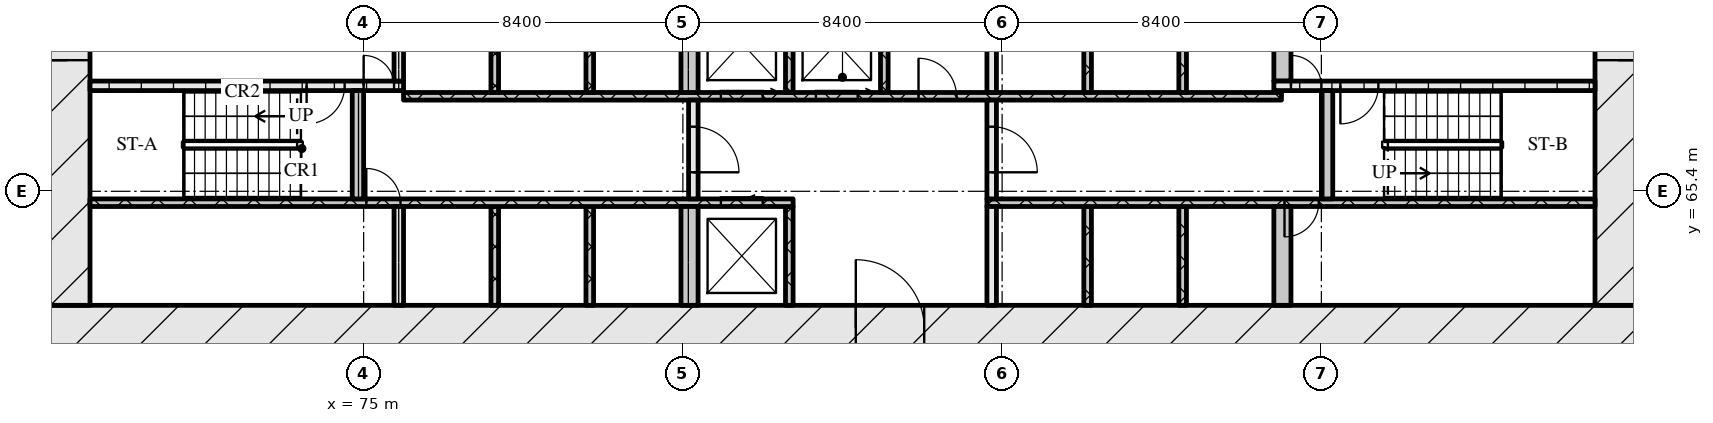
"""IFC4 building model, lengths in metres.
Left out: names, types, materials, properties, quantities, classifications, styles, units other than length and angle.
Written with IfcOpenShell. Run it as: python <this file> out.ifc"""

import sys

from ifc_helpers import new_model, si_unit, direction, frame, frame_2d, origin, place, context, subcontext, project, spatial, rectangle, extrude, element, fill, save


model = new_model("IFC4")
c1 = context("Model", 3, precision=1e-05, world=origin(), true_north=direction((0.0, 1.0)))
c2 = subcontext(c1, "Body", "Model", "MODEL_VIEW")
j1 = project(units=[si_unit("LENGTHUNIT", "METRE"), si_unit("PLANEANGLEUNIT", "RADIAN")], contexts=[c1])
p1 = place(None, origin())
s1 = spatial("IfcSite", under=j1, at=p1, CompositionType="ELEMENT")
p2 = place(p1, origin())
s2 = spatial("IfcBuilding", under=s1, at=p2, CompositionType="ELEMENT")
p3 = place(p2, frame((0.0, 0.0, 19.2)))
s3 = spatial("IfcBuildingStorey", under=s2, at=p3, CompositionType="ELEMENT", Elevation=19.2)
p4 = place(p3, frame((66.6, 61.8, 0.0), z_axis=(0.0, 0.0, 1.0), x_axis=(1.0, 0.0, 0.0)))
e1 = element("IfcWall", 1, at=p4, inside=s3, PredefinedType="SOLIDWALL", context=c2, shape_type="SweptSolid", body=[
    extrude(rectangle(XDim=42.0, YDim=1.2, at=frame_2d((21.0, 0.0))), origin(), (0.0, 0.0, 1.0), 4.2),
])
p5 = place(p4, frame((21.35, 0.0, 0.0)))
e2 = element("IfcOpeningElement", 2, at=p5, cuts=e1, PredefinedType="OPENING", context=c2, shape_type="SweptSolid", body=[
    extrude(rectangle(XDim=1.8, YDim=2.1, at=frame_2d((0.9, 1.05))), frame((0.0, 0.61, 0.0), z_axis=(0.0, -1.0, 0.0), x_axis=(1.0, 0.0, 0.0)), (0.0, 0.0, 1.0), 1.22),
])
p6 = place(p3, frame((67.2, 62.4, 0.0), z_axis=(0.0, 0.0, 1.0), x_axis=(0.0, 1.0, 0.0)))
e3 = element("IfcWall", 3, at=p6, inside=s3, PredefinedType="SOLIDWALL", context=c2, shape_type="SweptSolid", body=[
    extrude(rectangle(XDim=12.0, YDim=1.2, at=frame_2d((6.0, 0.0))), origin(), (0.0, 0.0, 1.0), 4.2),
])
p7 = place(p6, frame((6.45, 0.0, 0.0)))
e4 = element("IfcOpeningElement", 4, at=p7, cuts=e3, PredefinedType="OPENING", context=c2, shape_type="SweptSolid", body=[
    extrude(rectangle(XDim=1.2, YDim=2.1, at=frame_2d((0.6, 1.05))), frame((0.0, 0.61, 0.0), z_axis=(0.0, -1.0, 0.0), x_axis=(1.0, 0.0, 0.0)), (0.0, 0.0, 1.0), 1.22),
])
p8 = place(p3, frame((108.0, 62.4, 0.0), z_axis=(0.0, 0.0, 1.0), x_axis=(0.0, 1.0, 0.0)))
e5 = element("IfcWall", 5, at=p8, inside=s3, PredefinedType="SOLIDWALL", context=c2, shape_type="SweptSolid", body=[
    extrude(rectangle(XDim=12.0, YDim=1.2, at=frame_2d((6.0, 0.0))), origin(), (0.0, 0.0, 1.0), 4.2),
])
p9 = place(p8, frame((6.45, 0.0, 0.0)))
e6 = element("IfcOpeningElement", 6, at=p9, cuts=e5, PredefinedType="OPENING", context=c2, shape_type="SweptSolid", body=[
    extrude(rectangle(XDim=1.2, YDim=2.1, at=frame_2d((0.6, 1.05))), frame((0.0, 0.61, 0.0), z_axis=(0.0, -1.0, 0.0), x_axis=(1.0, 0.0, 0.0)), (0.0, 0.0, 1.0), 1.22),
])
p10 = place(p3, frame((75.925, 62.4, 0.0), z_axis=(0.0, 0.0, 1.0), x_axis=(0.0, 1.0, 0.0)))
e7 = element("IfcWall", 7, at=p10, inside=s3, PredefinedType="SOLIDWALL", context=c2, shape_type="SweptSolid", body=[
    extrude(rectangle(XDim=2.6, YDim=0.25, at=frame_2d((1.3, 0.0))), origin(), (0.0, 0.0, 1.0), 4.2),
])
for number, where, z_axis, x_axis in (
    (8, (78.45, 62.4, 0.0), (0.0, 0.0, 1.0), (0.0, 1.0, 0.0)),
    (9, (80.95, 62.4, 0.0), (0.0, 0.0, 1.0), (0.0, 1.0, 0.0)),
):
    element("IfcWall", number, at=place(p3, frame(where, z_axis=z_axis, x_axis=x_axis)), inside=s3, PredefinedType="SOLIDWALL", context=c2, shape_type="SweptSolid", body=[
        extrude(rectangle(XDim=2.6, YDim=0.2, at=frame_2d((1.3, 0.0))), origin(), (0.0, 0.0, 1.0), 4.2),
    ])
p11 = place(p3, frame((83.575, 62.4, 0.0), z_axis=(0.0, 0.0, 1.0), x_axis=(0.0, 1.0, 0.0)))
e10 = element("IfcWall", 10, at=p11, inside=s3, PredefinedType="SOLIDWALL", context=c2, shape_type="SweptSolid", body=[
    extrude(rectangle(XDim=2.6, YDim=0.45, at=frame_2d((1.3, 0.0))), origin(), (0.0, 0.0, 1.0), 4.2),
])
p12 = place(p3, frame((86.2, 62.4, 0.0), z_axis=(0.0, 0.0, 1.0), x_axis=(0.0, 1.0, 0.0)))
e11 = element("IfcWall", 11, at=p12, inside=s3, PredefinedType="SOLIDWALL", context=c2, shape_type="SweptSolid", body=[
    extrude(rectangle(XDim=2.6, YDim=0.2, at=frame_2d((1.3, 0.0))), origin(), (0.0, 0.0, 1.0), 4.2),
])
p13 = place(p3, frame((91.525, 62.4, 0.0), z_axis=(0.0, 0.0, 1.0), x_axis=(0.0, 1.0, 0.0)))
e12 = element("IfcWall", 12, at=p13, inside=s3, PredefinedType="SOLIDWALL", context=c2, shape_type="SweptSolid", body=[
    extrude(rectangle(XDim=2.6, YDim=0.25, at=frame_2d((1.3, 0.0))), origin(), (0.0, 0.0, 1.0), 4.2),
])
for number, where, z_axis, x_axis in (
    (13, (94.05, 62.4, 0.0), (0.0, 0.0, 1.0), (0.0, 1.0, 0.0)),
    (14, (96.55, 62.4, 0.0), (0.0, 0.0, 1.0), (0.0, 1.0, 0.0)),
):
    element("IfcWall", number, at=place(p3, frame(where, z_axis=z_axis, x_axis=x_axis)), inside=s3, PredefinedType="SOLIDWALL", context=c2, shape_type="SweptSolid", body=[
        extrude(rectangle(XDim=2.6, YDim=0.2, at=frame_2d((1.3, 0.0))), origin(), (0.0, 0.0, 1.0), 4.2),
    ])
p14 = place(p3, frame((99.175, 62.4, 0.0), z_axis=(0.0, 0.0, 1.0), x_axis=(0.0, 1.0, 0.0)))
e15 = element("IfcWall", 15, at=p14, inside=s3, PredefinedType="SOLIDWALL", context=c2, shape_type="SweptSolid", body=[
    extrude(rectangle(XDim=2.6, YDim=0.45, at=frame_2d((1.3, 0.0))), origin(), (0.0, 0.0, 1.0), 4.2),
])
p15 = place(p3, frame((67.8, 65.1, 0.0), z_axis=(0.0, 0.0, 1.0), x_axis=(1.0, 0.0, 0.0)))
e16 = element("IfcWall", 16, at=p15, inside=s3, PredefinedType="SOLIDWALL", context=c2, shape_type="SweptSolid", body=[
    extrude(rectangle(XDim=18.5, YDim=0.2, at=frame_2d((9.25, 0.0))), origin(), (0.0, 0.0, 1.0), 4.2),
])
p16 = place(p15, frame((7.27, 0.0, 0.0)))
e17 = element("IfcOpeningElement", 17, at=p16, cuts=e16, PredefinedType="OPENING", context=c2, shape_type="SweptSolid", body=[
    extrude(rectangle(XDim=0.9, YDim=2.1, at=frame_2d((0.45, 1.05))), frame((0.0, 0.11, 0.0), z_axis=(0.0, -1.0, 0.0), x_axis=(1.0, 0.0, 0.0)), (0.0, 0.0, 1.0), 0.22),
])
p17 = place(p15, frame((16.6, 0.0, 0.0)))
e18 = element("IfcOpeningElement", 18, at=p17, cuts=e16, PredefinedType="OPENING", context=c2, shape_type="SweptSolid", body=[
    extrude(rectangle(XDim=1.1, YDim=2.1, at=frame_2d((0.55, 1.05))), frame((0.0, 0.11, 0.0), z_axis=(0.0, -1.0, 0.0), x_axis=(1.0, 0.0, 0.0)), (0.0, 0.0, 1.0), 0.22),
])
p18 = place(p3, frame((91.4, 65.1, 0.0), z_axis=(0.0, 0.0, 1.0), x_axis=(1.0, 0.0, 0.0)))
e19 = element("IfcWall", 19, at=p18, inside=s3, PredefinedType="SOLIDWALL", context=c2, shape_type="SweptSolid", body=[
    extrude(rectangle(XDim=16.0, YDim=0.2, at=frame_2d((8.0, 0.0))), origin(), (0.0, 0.0, 1.0), 4.2),
])
p19 = place(p18, frame((7.83, 0.0, 0.0)))
e20 = element("IfcOpeningElement", 20, at=p19, cuts=e19, PredefinedType="OPENING", context=c2, shape_type="SweptSolid", body=[
    extrude(rectangle(XDim=0.9, YDim=2.1, at=frame_2d((0.45, 1.05))), frame((0.0, 0.11, 0.0), z_axis=(0.0, -1.0, 0.0), x_axis=(1.0, 0.0, 0.0)), (0.0, 0.0, 1.0), 0.22),
])
p20 = place(p3, frame((74.85, 65.2, 0.0), z_axis=(0.0, 0.0, 1.0), x_axis=(0.0, 1.0, 0.0)))
e21 = element("IfcWall", 21, at=p20, inside=s3, PredefinedType="SOLIDWALL", context=c2, shape_type="SweptSolid", body=[
    extrude(rectangle(XDim=2.85, YDim=0.3, at=frame_2d((1.425, 0.0))), origin(), (0.0, 0.0, 1.0), 4.2),
])
p21 = place(p3, frame((83.675, 65.2, 0.0), z_axis=(0.0, 0.0, 1.0), x_axis=(0.0, 1.0, 0.0)))
e22 = element("IfcWall", 22, at=p21, inside=s3, PredefinedType="SOLIDWALL", context=c2, shape_type="SweptSolid", body=[
    extrude(rectangle(XDim=2.6, YDim=0.25, at=frame_2d((1.3, 0.0))), origin(), (0.0, 0.0, 1.0), 4.2),
])
p22 = place(p21, frame((0.7, 0.0, 0.0)))
e23 = element("IfcOpeningElement", 23, at=p22, cuts=e22, PredefinedType="OPENING", context=c2, shape_type="SweptSolid", body=[
    extrude(rectangle(XDim=1.2, YDim=2.1, at=frame_2d((0.6, 1.05))), frame((0.0, 0.135, 0.0), z_axis=(0.0, -1.0, 0.0), x_axis=(1.0, 0.0, 0.0)), (0.0, 0.0, 1.0), 0.27),
])
p23 = place(p3, frame((91.525, 65.2, 0.0), z_axis=(0.0, 0.0, 1.0), x_axis=(0.0, 1.0, 0.0)))
e24 = element("IfcWall", 24, at=p23, inside=s3, PredefinedType="SOLIDWALL", context=c2, shape_type="SweptSolid", body=[
    extrude(rectangle(XDim=2.6, YDim=0.25, at=frame_2d((1.3, 0.0))), origin(), (0.0, 0.0, 1.0), 4.2),
])
p24 = place(p23, frame((0.7, 0.0, 0.0)))
e25 = element("IfcOpeningElement", 25, at=p24, cuts=e24, PredefinedType="OPENING", context=c2, shape_type="SweptSolid", body=[
    extrude(rectangle(XDim=1.2, YDim=2.1, at=frame_2d((0.6, 1.05))), frame((0.0, 0.135, 0.0), z_axis=(0.0, -1.0, 0.0), x_axis=(1.0, 0.0, 0.0)), (0.0, 0.0, 1.0), 0.27),
])
p25 = place(p3, frame((100.35, 65.2, 0.0), z_axis=(0.0, 0.0, 1.0), x_axis=(0.0, 1.0, 0.0)))
e26 = element("IfcWall", 26, at=p25, inside=s3, PredefinedType="SOLIDWALL", context=c2, shape_type="SweptSolid", body=[
    extrude(rectangle(XDim=2.85, YDim=0.3, at=frame_2d((1.425, 0.0))), origin(), (0.0, 0.0, 1.0), 4.2),
])
p26 = place(p3, frame((76.05, 67.9, 0.0), z_axis=(0.0, 0.0, 1.0), x_axis=(1.0, 0.0, 0.0)))
e27 = element("IfcWall", 27, at=p26, inside=s3, PredefinedType="SOLIDWALL", context=c2, shape_type="SweptSolid", body=[
    extrude(rectangle(XDim=23.1, YDim=0.2, at=frame_2d((11.55, 0.0))), origin(), (0.0, 0.0, 1.0), 4.2),
])
p27 = place(p26, frame((8.35, 0.0, 0.0)))
e28 = element("IfcOpeningElement", 28, at=p27, cuts=e27, PredefinedType="OPENING", context=c2, shape_type="SweptSolid", body=[
    extrude(rectangle(XDim=1.1, YDim=2.1, at=frame_2d((0.55, 1.05))), frame((0.0, 0.11, 0.0), z_axis=(0.0, -1.0, 0.0), x_axis=(1.0, 0.0, 0.0)), (0.0, 0.0, 1.0), 0.22),
])
p28 = place(p26, frame((10.85, 0.0, 0.0)))
e29 = element("IfcOpeningElement", 29, at=p28, cuts=e27, PredefinedType="OPENING", context=c2, shape_type="SweptSolid", body=[
    extrude(rectangle(XDim=1.1, YDim=2.1, at=frame_2d((0.55, 1.05))), frame((0.0, 0.11, 0.0), z_axis=(0.0, -1.0, 0.0), x_axis=(1.0, 0.0, 0.0)), (0.0, 0.0, 1.0), 0.22),
])
p29 = place(p26, frame((13.55, 0.0, 0.0)))
e30 = element("IfcOpeningElement", 30, at=p29, cuts=e27, PredefinedType="OPENING", context=c2, shape_type="SweptSolid", body=[
    extrude(rectangle(XDim=1.0, YDim=2.1, at=frame_2d((0.5, 1.05))), frame((0.0, 0.11, 0.0), z_axis=(0.0, -1.0, 0.0), x_axis=(1.0, 0.0, 0.0)), (0.0, 0.0, 1.0), 0.22),
])
for number, where, z_axis, x_axis in (
    (31, (78.45, 68.0, 0.0), (0.0, 0.0, 1.0), (0.0, 1.0, 0.0)),
    (32, (80.95, 68.0, 0.0), (0.0, 0.0, 1.0), (0.0, 1.0, 0.0)),
):
    element("IfcWall", number, at=place(p3, frame(where, z_axis=z_axis, x_axis=x_axis)), inside=s3, PredefinedType="SOLIDWALL", context=c2, shape_type="SweptSolid", body=[
        extrude(rectangle(XDim=2.6, YDim=0.2, at=frame_2d((1.3, 0.0))), origin(), (0.0, 0.0, 1.0), 4.2),
    ])
p30 = place(p3, frame((83.575, 68.0, 0.0), z_axis=(0.0, 0.0, 1.0), x_axis=(0.0, 1.0, 0.0)))
e33 = element("IfcWall", 33, at=p30, inside=s3, PredefinedType="SOLIDWALL", context=c2, shape_type="SweptSolid", body=[
    extrude(rectangle(XDim=2.6, YDim=0.45, at=frame_2d((1.3, 0.0))), origin(), (0.0, 0.0, 1.0), 4.2),
])
for number, where, z_axis, x_axis in (
    (34, (86.2, 68.0, 0.0), (0.0, 0.0, 1.0), (0.0, 1.0, 0.0)),
    (35, (88.7, 68.0, 0.0), (0.0, 0.0, 1.0), (0.0, 1.0, 0.0)),
):
    element("IfcWall", number, at=place(p3, frame(where, z_axis=z_axis, x_axis=x_axis)), inside=s3, PredefinedType="SOLIDWALL", context=c2, shape_type="SweptSolid", body=[
        extrude(rectangle(XDim=2.6, YDim=0.2, at=frame_2d((1.3, 0.0))), origin(), (0.0, 0.0, 1.0), 4.2),
    ])
p31 = place(p3, frame((91.525, 68.0, 0.0), z_axis=(0.0, 0.0, 1.0), x_axis=(0.0, 1.0, 0.0)))
e36 = element("IfcWall", 36, at=p31, inside=s3, PredefinedType="SOLIDWALL", context=c2, shape_type="SweptSolid", body=[
    extrude(rectangle(XDim=2.6, YDim=0.25, at=frame_2d((1.3, 0.0))), origin(), (0.0, 0.0, 1.0), 4.2),
])
for number, where, z_axis, x_axis in (
    (37, (94.05, 68.0, 0.0), (0.0, 0.0, 1.0), (0.0, 1.0, 0.0)),
    (38, (96.55, 68.0, 0.0), (0.0, 0.0, 1.0), (0.0, 1.0, 0.0)),
):
    element("IfcWall", number, at=place(p3, frame(where, z_axis=z_axis, x_axis=x_axis)), inside=s3, PredefinedType="SOLIDWALL", context=c2, shape_type="SweptSolid", body=[
        extrude(rectangle(XDim=2.6, YDim=0.2, at=frame_2d((1.3, 0.0))), origin(), (0.0, 0.0, 1.0), 4.2),
    ])
p32 = place(p3, frame((98.95, 68.025, 0.0), z_axis=(0.0, 0.0, 1.0), x_axis=(1.0, 0.0, 0.0)))
e39 = element("IfcWall", 39, at=p32, inside=s3, PredefinedType="SOLIDWALL", context=c2, shape_type="SweptSolid", body=[
    extrude(rectangle(XDim=0.2, YDim=0.05, at=frame_2d((0.1, 0.0))), origin(), (0.0, 0.0, 1.0), 4.2),
])
p33 = place(p3, frame((67.8, 68.175, 0.0), z_axis=(0.0, 0.0, 1.0), x_axis=(1.0, 0.0, 0.0)))
e40 = element("IfcWall", 40, at=p33, inside=s3, PredefinedType="SOLIDWALL", context=c2, shape_type="SweptSolid", body=[
    extrude(rectangle(XDim=8.25, YDim=0.25, at=frame_2d((4.125, 0.0))), origin(), (0.0, 0.0, 1.0), 4.2),
])
p34 = place(p33, frame((5.7, 0.0, 0.0)))
e41 = element("IfcOpeningElement", 41, at=p34, cuts=e40, PredefinedType="OPENING", context=c2, shape_type="SweptSolid", body=[
    extrude(rectangle(XDim=1.0, YDim=2.1, at=frame_2d((0.5, 1.05))), frame((0.0, 0.135, 0.0), z_axis=(0.0, -1.0, 0.0), x_axis=(1.0, 0.0, 0.0)), (0.0, 0.0, 1.0), 0.27),
])
p35 = place(p33, frame((7.2, 0.0, 0.0)))
e42 = element("IfcOpeningElement", 42, at=p35, cuts=e40, PredefinedType="OPENING", context=c2, shape_type="SweptSolid", body=[
    extrude(rectangle(XDim=0.8, YDim=2.1, at=frame_2d((0.4, 1.05))), frame((0.0, 0.135, 0.0), z_axis=(0.0, -1.0, 0.0), x_axis=(1.0, 0.0, 0.0)), (0.0, 0.0, 1.0), 0.27),
])
p36 = place(p3, frame((98.95, 68.175, 0.0), z_axis=(0.0, 0.0, 1.0), x_axis=(1.0, 0.0, 0.0)))
e43 = element("IfcWall", 43, at=p36, inside=s3, PredefinedType="SOLIDWALL", context=c2, shape_type="SweptSolid", body=[
    extrude(rectangle(XDim=8.45, YDim=0.25, at=frame_2d((4.225, 0.0))), origin(), (0.0, 0.0, 1.0), 4.2),
])
p37 = place(p36, frame((0.45, 0.0, 0.0)))
e44 = element("IfcOpeningElement", 44, at=p37, cuts=e43, PredefinedType="OPENING", context=c2, shape_type="SweptSolid", body=[
    extrude(rectangle(XDim=0.8, YDim=2.1, at=frame_2d((0.4, 1.05))), frame((0.0, 0.135, 0.0), z_axis=(0.0, -1.0, 0.0), x_axis=(1.0, 0.0, 0.0)), (0.0, 0.0, 1.0), 0.27),
])
p38 = place(p36, frame((1.75, 0.0, 0.0)))
e45 = element("IfcOpeningElement", 45, at=p38, cuts=e43, PredefinedType="OPENING", context=c2, shape_type="SweptSolid", body=[
    extrude(rectangle(XDim=1.0, YDim=2.1, at=frame_2d((0.5, 1.05))), frame((0.0, 0.135, 0.0), z_axis=(0.0, -1.0, 0.0), x_axis=(1.0, 0.0, 0.0)), (0.0, 0.0, 1.0), 0.27),
])
p39 = place(p3, frame((75.925, 68.3, 0.0), z_axis=(0.0, 0.0, 1.0), x_axis=(0.0, 1.0, 0.0)))
e46 = element("IfcWall", 46, at=p39, inside=s3, PredefinedType="SOLIDWALL", context=c2, shape_type="SweptSolid", body=[
    extrude(rectangle(XDim=2.3, YDim=0.25, at=frame_2d((1.15, 0.0))), origin(), (0.0, 0.0, 1.0), 4.2),
])
p40 = place(p3, frame((99.175, 68.3, 0.0), z_axis=(0.0, 0.0, 1.0), x_axis=(0.0, 1.0, 0.0)))
e47 = element("IfcWall", 47, at=p40, inside=s3, PredefinedType="SOLIDWALL", context=c2, shape_type="SweptSolid", body=[
    extrude(rectangle(XDim=2.3, YDim=0.45, at=frame_2d((1.15, 0.0))), origin(), (0.0, 0.0, 1.0), 4.2),
])
p41 = place(p5, origin())
e48 = element("IfcDoor", 48, at=p41, inside=s3, OperationType="DOUBLE_DOOR_SINGLE_SWING", PredefinedType="DOOR", context=c2, shape_type="SweptSolid", body=[
    extrude(rectangle(XDim=1.8, YDim=2.1, at=frame_2d((0.9, 1.05))), frame((0.0, 0.025, 0.0), z_axis=(0.0, -1.0, 0.0), x_axis=(1.0, 0.0, 0.0)), (0.0, 0.0, 1.0), 0.05),
])
fill(e2, e48)
p42 = place(p16, origin())
e49 = element("IfcDoor", 49, at=p42, inside=s3, OperationType="SINGLE_SWING_LEFT", PredefinedType="DOOR", context=c2, shape_type="SweptSolid", body=[
    extrude(rectangle(XDim=0.9, YDim=2.1, at=frame_2d((0.45, 1.05))), frame((0.0, 0.025, 0.0), z_axis=(0.0, -1.0, 0.0), x_axis=(1.0, 0.0, 0.0)), (0.0, 0.0, 1.0), 0.05),
])
fill(e17, e49)
p43 = place(p17, origin())
e50 = element("IfcDoor", 50, at=p43, inside=s3, OperationType="SLIDING_TO_LEFT", PredefinedType="DOOR", context=c2, shape_type="SweptSolid", body=[
    extrude(rectangle(XDim=1.1, YDim=2.1, at=frame_2d((0.55, 1.05))), frame((0.0, 0.025, 0.0), z_axis=(0.0, -1.0, 0.0), x_axis=(1.0, 0.0, 0.0)), (0.0, 0.0, 1.0), 0.05),
])
fill(e18, e50)
p44 = place(p19, origin())
e51 = element("IfcDoor", 51, at=p44, inside=s3, OperationType="SINGLE_SWING_RIGHT", PredefinedType="DOOR", context=c2, shape_type="SweptSolid", body=[
    extrude(rectangle(XDim=0.9, YDim=2.1, at=frame_2d((0.45, 1.05))), frame((0.0, 0.025, 0.0), z_axis=(0.0, -1.0, 0.0), x_axis=(1.0, 0.0, 0.0)), (0.0, 0.0, 1.0), 0.05),
])
fill(e20, e51)
p45 = place(p22, origin())
e52 = element("IfcDoor", 52, at=p45, inside=s3, OperationType="SINGLE_SWING_RIGHT", PredefinedType="DOOR", context=c2, shape_type="SweptSolid", body=[
    extrude(rectangle(XDim=1.2, YDim=2.1, at=frame_2d((0.6, 1.05))), frame((0.0, 0.025, 0.0), z_axis=(0.0, -1.0, 0.0), x_axis=(1.0, 0.0, 0.0)), (0.0, 0.0, 1.0), 0.05),
])
fill(e23, e52)
p46 = place(p24, origin())
e53 = element("IfcDoor", 53, at=p46, inside=s3, OperationType="SINGLE_SWING_RIGHT", PredefinedType="DOOR", context=c2, shape_type="SweptSolid", body=[
    extrude(rectangle(XDim=1.2, YDim=2.1, at=frame_2d((0.6, 1.05))), frame((0.0, 0.025, 0.0), z_axis=(0.0, -1.0, 0.0), x_axis=(1.0, 0.0, 0.0)), (0.0, 0.0, 1.0), 0.05),
])
fill(e25, e53)
p47 = place(p27, origin())
e54 = element("IfcDoor", 54, at=p47, inside=s3, OperationType="SLIDING_TO_RIGHT", PredefinedType="DOOR", context=c2, shape_type="SweptSolid", body=[
    extrude(rectangle(XDim=1.1, YDim=2.1, at=frame_2d((0.55, 1.05))), frame((0.0, 0.025, 0.0), z_axis=(0.0, -1.0, 0.0), x_axis=(1.0, 0.0, 0.0)), (0.0, 0.0, 1.0), 0.05),
])
fill(e28, e54)
p48 = place(p28, origin())
e55 = element("IfcDoor", 55, at=p48, inside=s3, OperationType="SLIDING_TO_RIGHT", PredefinedType="DOOR", context=c2, shape_type="SweptSolid", body=[
    extrude(rectangle(XDim=1.1, YDim=2.1, at=frame_2d((0.55, 1.05))), frame((0.0, 0.025, 0.0), z_axis=(0.0, -1.0, 0.0), x_axis=(1.0, 0.0, 0.0)), (0.0, 0.0, 1.0), 0.05),
])
fill(e29, e55)
p49 = place(p29, origin())
e56 = element("IfcDoor", 56, at=p49, inside=s3, OperationType="SINGLE_SWING_LEFT", PredefinedType="DOOR", context=c2, shape_type="SweptSolid", body=[
    extrude(rectangle(XDim=1.0, YDim=2.1, at=frame_2d((0.5, 1.05))), frame((0.0, 0.025, 0.0), z_axis=(0.0, -1.0, 0.0), x_axis=(1.0, 0.0, 0.0)), (0.0, 0.0, 1.0), 0.05),
])
fill(e30, e56)
p50 = place(p34, origin())
e57 = element("IfcDoor", 57, at=p50, inside=s3, OperationType="SINGLE_SWING_RIGHT", PredefinedType="DOOR", context=c2, shape_type="SweptSolid", body=[
    extrude(rectangle(XDim=1.0, YDim=2.1, at=frame_2d((0.5, 1.05))), frame((0.0, 0.025, 0.0), z_axis=(0.0, -1.0, 0.0), x_axis=(1.0, 0.0, 0.0)), (0.0, 0.0, 1.0), 0.05),
])
fill(e41, e57)
p51 = place(p35, origin())
e58 = element("IfcDoor", 58, at=p51, inside=s3, OperationType="SINGLE_SWING_LEFT", PredefinedType="DOOR", context=c2, shape_type="SweptSolid", body=[
    extrude(rectangle(XDim=0.8, YDim=2.1, at=frame_2d((0.4, 1.05))), frame((0.0, 0.025, 0.0), z_axis=(0.0, -1.0, 0.0), x_axis=(1.0, 0.0, 0.0)), (0.0, 0.0, 1.0), 0.05),
])
fill(e42, e58)
p52 = place(p37, origin())
e59 = element("IfcDoor", 59, at=p52, inside=s3, OperationType="SINGLE_SWING_LEFT", PredefinedType="DOOR", context=c2, shape_type="SweptSolid", body=[
    extrude(rectangle(XDim=0.8, YDim=2.1, at=frame_2d((0.4, 1.05))), frame((0.0, 0.025, 0.0), z_axis=(0.0, -1.0, 0.0), x_axis=(1.0, 0.0, 0.0)), (0.0, 0.0, 1.0), 0.05),
])
fill(e44, e59)
p53 = place(p38, origin())
e60 = element("IfcDoor", 60, at=p53, inside=s3, OperationType="SINGLE_SWING_RIGHT", PredefinedType="DOOR", context=c2, shape_type="SweptSolid", body=[
    extrude(rectangle(XDim=1.0, YDim=2.1, at=frame_2d((0.5, 1.05))), frame((0.0, 0.025, 0.0), z_axis=(0.0, -1.0, 0.0), x_axis=(1.0, 0.0, 0.0)), (0.0, 0.0, 1.0), 0.05),
])
fill(e45, e60)
p54 = place(p7, origin())
e61 = element("IfcDoor", 61, at=p54, inside=s3, OperationType="SINGLE_SWING_LEFT", PredefinedType="DOOR", context=c2, shape_type="SweptSolid", body=[
    extrude(rectangle(XDim=1.2, YDim=2.1, at=frame_2d((0.6, 1.05))), frame((0.0, 0.025, 0.0), z_axis=(0.0, -1.0, 0.0), x_axis=(1.0, 0.0, 0.0)), (0.0, 0.0, 1.0), 0.05),
])
fill(e4, e61)
p55 = place(p9, origin())
e62 = element("IfcDoor", 62, at=p55, inside=s3, OperationType="SINGLE_SWING_RIGHT", PredefinedType="DOOR", context=c2, shape_type="SweptSolid", body=[
    extrude(rectangle(XDim=1.2, YDim=2.1, at=frame_2d((0.6, 1.05))), frame((0.0, 0.025, 0.0), z_axis=(0.0, -1.0, 0.0), x_axis=(1.0, 0.0, 0.0)), (0.0, 0.0, 1.0), 0.05),
])
fill(e6, e62)
save(model, sys.argv[1])
